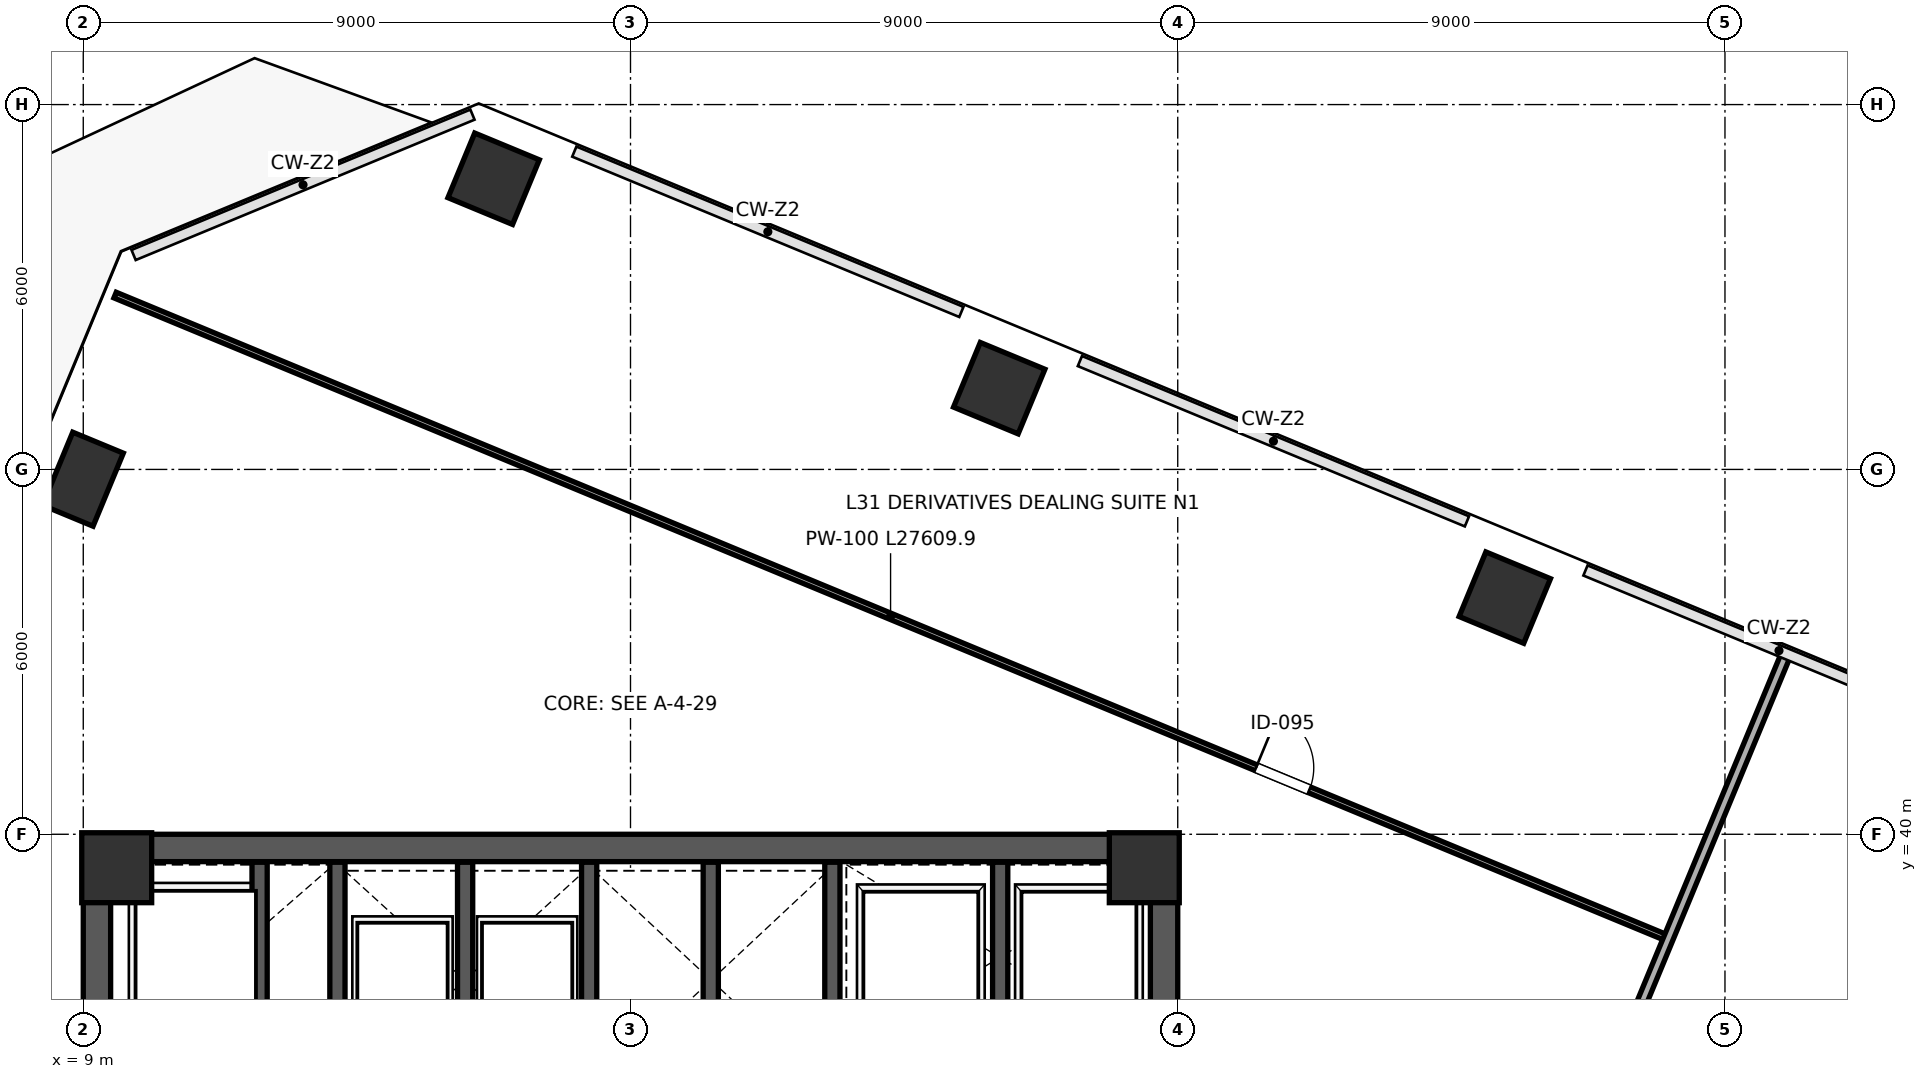
"""IFC4 building model, lengths in metres.
Left out: names, types, materials, properties, quantities, classifications, styles, units other than length and angle.
Written with IfcOpenShell. Run it as: python <this file> out.ifc"""

import sys

from ifc_helpers import new_model, si_unit, direction, frame, frame_2d, origin, origin_2d, place, context, subcontext, project, spatial, rectangle, extrude, source, transform, mapped, element, fill, save


model = new_model("IFC4")
c1 = context("Model", 3, precision=1e-05, world=origin(), true_north=direction((0.0, 1.0)))
c2 = subcontext(c1, "Body", "Model", "MODEL_VIEW")
j1 = project(units=[si_unit("LENGTHUNIT", "METRE"), si_unit("PLANEANGLEUNIT", "RADIAN")], contexts=[c1])
p1 = place(None, origin())
s1 = spatial("IfcSite", under=j1, at=p1, CompositionType="ELEMENT")
p2 = place(p1, origin())
s2 = spatial("IfcBuilding", under=s1, at=p2, CompositionType="ELEMENT")
p3 = place(p2, frame((0.0, 0.0, 141.4)))
s3 = spatial("IfcBuildingStorey", under=s2, at=p3, CompositionType="ELEMENT", Elevation=141.4)
m1 = source(origin(), c2, "Body", "SweptSolid", [
    extrude(rectangle(XDim=1.15, YDim=1.15, at=origin_2d()), origin(), (0.0, 0.0, 1.0), 4.199),
])
for number, where, z_axis, x_axis in (
    (1, (9.55, 39.45, 0.001), (0.0, 0.0, 1.0), (1.0, 0.0, 0.0)),
    (2, (26.45, 39.45, 0.001), (0.0, 0.0, 1.0), (1.0, 0.0, 0.0)),
):
    element("IfcColumn", number, at=place(p3, frame(where, z_axis=z_axis, x_axis=x_axis)), inside=s3, PredefinedType="COLUMN", context=c2, shape_type="MappedRepresentation", body=[
        mapped(m1, transform((0.0, 0.0, 0.0), scale=1.0)),
    ])
m2 = source(origin(), c2, "Body", "SweptSolid", [
    extrude(rectangle(XDim=1.15, YDim=1.15, at=origin_2d()), origin(), (0.0, 0.0, 1.0), 4.199),
])
for number, where, z_axis, x_axis in (
    (3, (15.749, 50.78, 0.001), (0.0, 0.0, 1.0), (-0.924, 0.383, 0.0)),
    (4, (24.064, 47.336, 0.001), (0.0, 0.0, 1.0), (-0.924, 0.383, 0.0)),
    (5, (32.379, 43.892, 0.001), (0.0, 0.0, 1.0), (-0.924, 0.383, 0.0)),
):
    element("IfcColumn", number, at=place(p3, frame(where, z_axis=z_axis, x_axis=x_axis)), inside=s3, PredefinedType="COLUMN", context=c2, shape_type="MappedRepresentation", body=[
        mapped(m2, transform((0.0, 0.0, 0.0), scale=1.0)),
    ])
m3 = source(origin(), c2, "Body", "SweptSolid", [
    extrude(rectangle(XDim=0.9, YDim=1.3, at=origin_2d()), origin(), (0.0, 0.0, 1.0), 4.199),
])
p4 = place(p3, frame((8.994, 45.839, 0.001), z_axis=(0.0, 0.0, 1.0), x_axis=(-0.923879532511, 0.382683432365, 0.0)))
e6 = element("IfcColumn", 6, at=p4, inside=s3, PredefinedType="PILASTER", context=c2, shape_type="MappedRepresentation", body=[
    mapped(m3, transform((0.0, 0.0, 0.0), scale=1.0)),
])
p5 = place(p3, frame((9.225, 24.45, 0.0), z_axis=(0.0, 0.0, 1.0), x_axis=(0.0, 1.0, 0.0)))
e7 = element("IfcWall", 7, at=p5, inside=s3, PredefinedType="SHEAR", context=c2, shape_type="SweptSolid", body=[
    extrude(rectangle(XDim=15.1, YDim=0.45, at=frame_2d((7.55, 0.0))), origin(), (0.0, 0.0, 1.0), 3.96),
])
p6 = place(p3, frame((26.775, 24.45, 0.0), z_axis=(0.0, 0.0, 1.0), x_axis=(0.0, 1.0, 0.0)))
e8 = element("IfcWall", 8, at=p6, inside=s3, PredefinedType="SHEAR", context=c2, shape_type="SweptSolid", body=[
    extrude(rectangle(XDim=15.1, YDim=0.45, at=frame_2d((7.55, 0.0))), origin(), (0.0, 0.0, 1.0), 3.96),
])
p7 = place(p6, frame((8.6, 0.0, 0.0)))
e9 = element("IfcOpeningElement", 9, at=p7, cuts=e8, PredefinedType="OPENING", context=c2, shape_type="SweptSolid", body=[
    extrude(rectangle(XDim=1.15, YDim=2.2, at=frame_2d((0.575, 1.1))), frame((0.0, 0.235, 0.0), z_axis=(0.0, -1.0, 0.0), x_axis=(1.0, 0.0, 0.0)), (0.0, 0.0, 1.0), 0.47),
])
p8 = place(p3, frame((9.0, 39.775, 0.0), z_axis=(0.0, 0.0, 1.0), x_axis=(1.0, 0.0, 0.0)))
e10 = element("IfcWall", 10, at=p8, inside=s3, PredefinedType="SHEAR", context=c2, shape_type="SweptSolid", body=[
    extrude(rectangle(XDim=18.0, YDim=0.45, at=frame_2d((9.0, 0.0))), origin(), (0.0, 0.0, 1.0), 3.96),
])
p9 = place(p3, frame((21.32, 32.12, 0.0), z_axis=(0.0, 0.0, 1.0), x_axis=(0.0, 1.0, 0.0)))
e11 = element("IfcWall", 11, at=p9, inside=s3, PredefinedType="SHEAR", context=c2, shape_type="SweptSolid", body=[
    extrude(rectangle(XDim=7.42, YDim=0.25, at=frame_2d((3.71, 0.0))), origin(), (0.0, 0.0, 1.0), 3.96),
])
p10 = place(p9, frame((1.4, 0.0, 0.0)))
e12 = element("IfcOpeningElement", 12, at=p10, cuts=e11, PredefinedType="OPENING", context=c2, shape_type="SweptSolid", body=[
    extrude(rectangle(XDim=1.15, YDim=2.2, at=frame_2d((0.575, 1.1))), frame((0.0, 0.135, 0.0), z_axis=(0.0, -1.0, 0.0), x_axis=(1.0, 0.0, 0.0)), (0.0, 0.0, 1.0), 0.27),
])
p11 = place(p3, frame((11.9, 36.31, 0.0), z_axis=(0.0, 0.0, 1.0), x_axis=(0.0, 1.0, 0.0)))
e13 = element("IfcWall", 13, at=p11, inside=s3, PredefinedType="SHEAR", context=c2, shape_type="SweptSolid", body=[
    extrude(rectangle(XDim=3.23, YDim=0.25, at=frame_2d((1.615, 0.0))), origin(), (0.0, 0.0, 1.0), 3.96),
])
p12 = place(p3, frame((24.08, 36.48, 0.0), z_axis=(0.0, 0.0, 1.0), x_axis=(0.0, 1.0, 0.0)))
e14 = element("IfcWall", 14, at=p12, inside=s3, PredefinedType="SHEAR", context=c2, shape_type="SweptSolid", body=[
    extrude(rectangle(XDim=3.06, YDim=0.25, at=frame_2d((1.53, 0.0))), origin(), (0.0, 0.0, 1.0), 3.96),
])
for number, where, z_axis, x_axis in (
    (15, (13.18, 35.81, 0.0), (0.0, 0.0, 1.0), (0.0, 1.0, 0.0)),
    (16, (15.28, 35.81, 0.0), (0.0, 0.0, 1.0), (0.0, 1.0, 0.0)),
    (17, (17.32, 35.81, 0.0), (0.0, 0.0, 1.0), (0.0, 1.0, 0.0)),
    (18, (19.32, 35.81, 0.0), (0.0, 0.0, 1.0), (0.0, 1.0, 0.0)),
):
    element("IfcWall", number, at=place(p3, frame(where, z_axis=z_axis, x_axis=x_axis)), inside=s3, PredefinedType="SHEAR", context=c2, shape_type="SweptSolid", body=[
        extrude(rectangle(XDim=3.73, YDim=0.25, at=frame_2d((1.865, 0.0))), origin(), (0.0, 0.0, 1.0), 3.96),
    ])
p13 = place(p3, frame((9.523, 48.867, 0.0), z_axis=(0.0, 0.0, 1.0), x_axis=(0.923882225555, -0.382676930718, 0.0)))
e19 = element("IfcWall", 19, at=p13, inside=s3, PredefinedType="PARTITIONING", context=c2, shape_type="SweptSolid", body=[
    extrude(rectangle(XDim=27.61, YDim=0.1, at=frame_2d((13.805, 0.0))), origin(), (0.0, 0.0, 1.0), 3.96),
])
p14 = place(p13, frame((20.31, 0.0, 0.0)))
e20 = element("IfcOpeningElement", 20, at=p14, cuts=e19, PredefinedType="OPENING", context=c2, shape_type="SweptSolid", body=[
    extrude(rectangle(XDim=0.95, YDim=2.15, at=frame_2d((0.475, 1.075))), frame((0.0, 0.06, 0.0), z_axis=(0.0, -1.0, 0.0), x_axis=(1.0, 0.0, 0.0)), (0.0, 0.0, 1.0), 0.12),
])
p15 = place(p3, frame((30.162, 26.442, 0.0), z_axis=(0.0, 0.0, 1.0), x_axis=(0.382688600046, 0.923877391971, 0.0)))
e21 = element("IfcWall", 21, at=p15, inside=s3, PredefinedType="PARTITIONING", context=c2, shape_type="SweptSolid", body=[
    extrude(rectangle(XDim=17.84, YDim=0.16, at=frame_2d((8.92, 0.0))), origin(), (0.0, 0.0, 1.0), 3.195),
])
m4 = source(origin(), c2, "Body", "SweptSolid", [
    extrude(rectangle(XDim=0.95, YDim=2.15, at=frame_2d((0.475, 1.075))), frame((0.0, 0.025, 0.0), z_axis=(0.0, -1.0, 0.0), x_axis=(1.0, 0.0, 0.0)), (0.0, 0.0, 1.0), 0.05),
])
p16 = place(p14, origin())
e22 = element("IfcDoor", 22, at=p16, inside=s3, OperationType="SINGLE_SWING_LEFT", PredefinedType="DOOR", context=c2, shape_type="MappedRepresentation", body=[
    mapped(m4, transform((0.0, 0.0, 0.0), scale=1.0)),
])
fill(e20, e22)
save(model, sys.argv[1])
